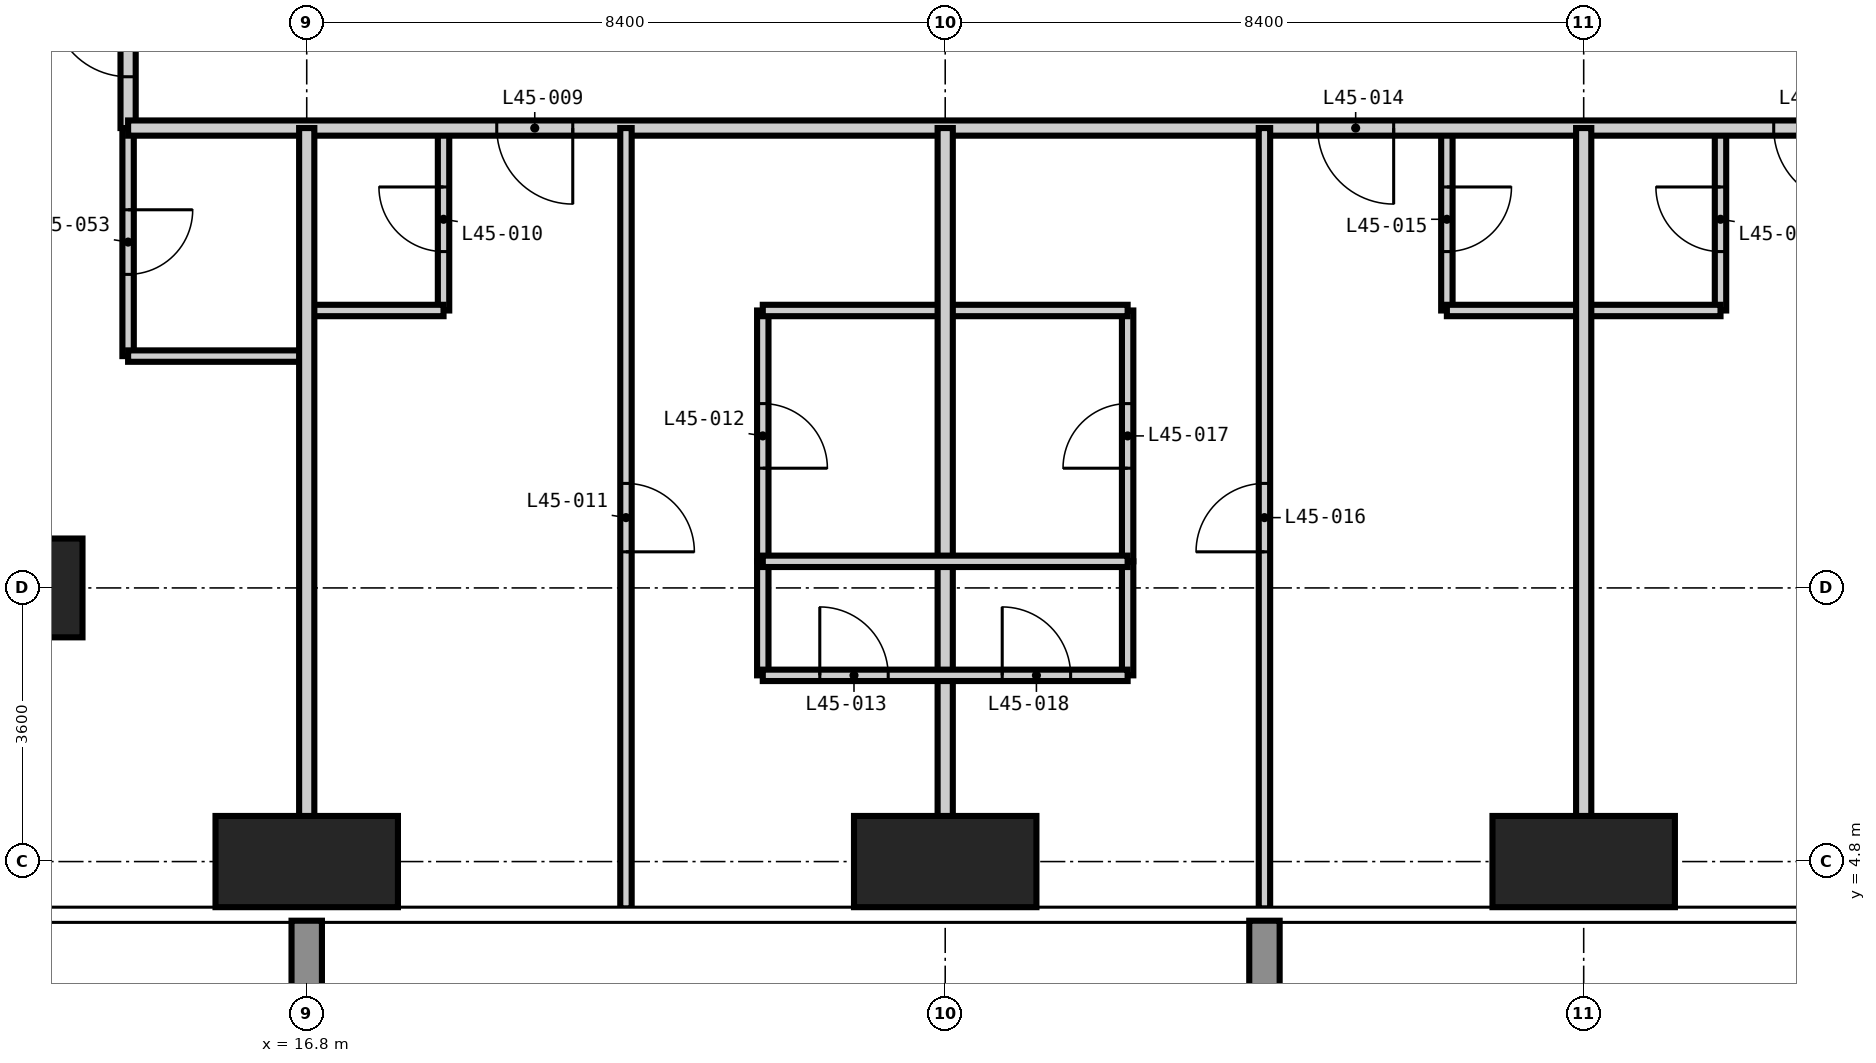
"""IFC4 building model, lengths in metres.
Left out: names, types, materials, properties, quantities, classifications, styles, units other than length and angle.
Written with IfcOpenShell. Run it as: python <this file> out.ifc"""

import sys

from ifc_helpers import new_model, si_unit, direction, frame, frame_2d, origin, origin_2d, place, context, subcontext, project, spatial, rectangle, extrude, element, fill, save


model = new_model("IFC4")
c1 = context("Model", 3, precision=1e-05, world=origin(), true_north=direction((0.0, 1.0)))
c2 = subcontext(c1, "Body", "Model", "MODEL_VIEW")
j1 = project(units=[si_unit("LENGTHUNIT", "METRE"), si_unit("PLANEANGLEUNIT", "RADIAN")], contexts=[c1])
p1 = place(None, origin())
s1 = spatial("IfcSite", under=j1, at=p1, CompositionType="ELEMENT")
p2 = place(p1, origin())
s2 = spatial("IfcBuilding", under=s1, at=p2, CompositionType="ELEMENT")
p3 = place(p2, frame((0.0, 0.0, 177.0)))
s3 = spatial("IfcBuildingStorey", under=s2, at=p3, CompositionType="ELEMENT", Elevation=177.0)
p4 = place(p3, frame((13.2, 8.4, -0.35), z_axis=(0.0, 0.0, 1.0), x_axis=(1.0, 0.0, 0.0)))
e1 = element("IfcColumn", 1, at=p4, inside=s3, PredefinedType="COLUMN", context=c2, shape_type="SweptSolid", body=[
    extrude(rectangle(XDim=1.3, YDim=1.3, at=origin_2d()), origin(), (0.0, 0.0, 1.0), 3.6),
])
for number, where, z_axis, x_axis in (
    (2, (16.8, 4.8, -0.35), (0.0, 0.0, 1.0), (1.0, 0.0, 0.0)),
    (3, (25.2, 4.8, -0.35), (0.0, 0.0, 1.0), (1.0, 0.0, 0.0)),
    (4, (33.6, 4.8, -0.35), (0.0, 0.0, 1.0), (1.0, 0.0, 0.0)),
):
    element("IfcColumn", number, at=place(p3, frame(where, z_axis=z_axis, x_axis=x_axis)), inside=s3, PredefinedType="COLUMN", context=c2, shape_type="SweptSolid", body=[
        extrude(rectangle(XDim=2.4, YDim=1.2, at=origin_2d()), origin(), (0.0, 0.0, 1.0), 3.6),
    ])
p5 = place(p3, frame((14.45, 11.45, 0.0), z_axis=(0.0, 0.0, 1.0), x_axis=(0.0, 1.0, 0.0)))
e5 = element("IfcWall", 5, at=p5, inside=s3, PredefinedType="PARTITIONING", context=c2, shape_type="SweptSolid", body=[
    extrude(rectangle(XDim=3.0, YDim=0.15, at=frame_2d((1.5, 0.0))), origin(), (0.0, 0.0, 1.0), 3.25),
])
p6 = place(p5, frame((1.075, 0.0, 0.0)))
e6 = element("IfcOpeningElement", 6, at=p6, cuts=e5, PredefinedType="OPENING", context=c2, shape_type="SweptSolid", body=[
    extrude(rectangle(XDim=0.85, YDim=2.1, at=frame_2d((0.425, 1.05))), frame((0.0, 0.085, 0.0), z_axis=(0.0, -1.0, 0.0), x_axis=(1.0, 0.0, 0.0)), (0.0, 0.0, 1.0), 0.17),
])
p7 = place(p3, frame((18.6, 12.05, 0.0), z_axis=(0.0, 0.0, 1.0), x_axis=(0.0, 1.0, 0.0)))
e7 = element("IfcWall", 7, at=p7, inside=s3, PredefinedType="PARTITIONING", context=c2, shape_type="SweptSolid", body=[
    extrude(rectangle(XDim=2.4, YDim=0.15, at=frame_2d((1.2, 0.0))), origin(), (0.0, 0.0, 1.0), 3.25),
])
p8 = place(p7, frame((0.775, 0.0, 0.0)))
e8 = element("IfcOpeningElement", 8, at=p8, cuts=e7, PredefinedType="OPENING", context=c2, shape_type="SweptSolid", body=[
    extrude(rectangle(XDim=0.85, YDim=2.1, at=frame_2d((0.425, 1.05))), frame((0.0, 0.085, 0.0), z_axis=(0.0, -1.0, 0.0), x_axis=(1.0, 0.0, 0.0)), (0.0, 0.0, 1.0), 0.17),
])
p9 = place(p3, frame((22.8, 8.75, 0.0), z_axis=(0.0, 0.0, 1.0), x_axis=(0.0, 1.0, 0.0)))
e9 = element("IfcWall", 9, at=p9, inside=s3, PredefinedType="PARTITIONING", context=c2, shape_type="SweptSolid", body=[
    extrude(rectangle(XDim=3.3, YDim=0.15, at=frame_2d((1.65, 0.0))), origin(), (0.0, 0.0, 1.0), 3.25),
])
p10 = place(p9, frame((1.225, 0.0, 0.0)))
e10 = element("IfcOpeningElement", 10, at=p10, cuts=e9, PredefinedType="OPENING", context=c2, shape_type="SweptSolid", body=[
    extrude(rectangle(XDim=0.85, YDim=2.1, at=frame_2d((0.425, 1.05))), frame((0.0, 0.085, 0.0), z_axis=(0.0, -1.0, 0.0), x_axis=(1.0, 0.0, 0.0)), (0.0, 0.0, 1.0), 0.17),
])
p11 = place(p3, frame((27.6, 8.75, 0.0), z_axis=(0.0, 0.0, 1.0), x_axis=(0.0, 1.0, 0.0)))
e11 = element("IfcWall", 11, at=p11, inside=s3, PredefinedType="PARTITIONING", context=c2, shape_type="SweptSolid", body=[
    extrude(rectangle(XDim=3.3, YDim=0.15, at=frame_2d((1.65, 0.0))), origin(), (0.0, 0.0, 1.0), 3.25),
])
p12 = place(p11, frame((1.225, 0.0, 0.0)))
e12 = element("IfcOpeningElement", 12, at=p12, cuts=e11, PredefinedType="OPENING", context=c2, shape_type="SweptSolid", body=[
    extrude(rectangle(XDim=0.85, YDim=2.1, at=frame_2d((0.425, 1.05))), frame((0.0, 0.085, 0.0), z_axis=(0.0, -1.0, 0.0), x_axis=(1.0, 0.0, 0.0)), (0.0, 0.0, 1.0), 0.17),
])
p13 = place(p3, frame((31.8, 12.05, 0.0), z_axis=(0.0, 0.0, 1.0), x_axis=(0.0, 1.0, 0.0)))
e13 = element("IfcWall", 13, at=p13, inside=s3, PredefinedType="PARTITIONING", context=c2, shape_type="SweptSolid", body=[
    extrude(rectangle(XDim=2.4, YDim=0.15, at=frame_2d((1.2, 0.0))), origin(), (0.0, 0.0, 1.0), 3.25),
])
p14 = place(p13, frame((0.775, 0.0, 0.0)))
e14 = element("IfcOpeningElement", 14, at=p14, cuts=e13, PredefinedType="OPENING", context=c2, shape_type="SweptSolid", body=[
    extrude(rectangle(XDim=0.85, YDim=2.1, at=frame_2d((0.425, 1.05))), frame((0.0, 0.085, 0.0), z_axis=(0.0, -1.0, 0.0), x_axis=(1.0, 0.0, 0.0)), (0.0, 0.0, 1.0), 0.17),
])
p15 = place(p3, frame((35.4, 12.05, 0.0), z_axis=(0.0, 0.0, 1.0), x_axis=(0.0, 1.0, 0.0)))
e15 = element("IfcWall", 15, at=p15, inside=s3, PredefinedType="PARTITIONING", context=c2, shape_type="SweptSolid", body=[
    extrude(rectangle(XDim=2.4, YDim=0.15, at=frame_2d((1.2, 0.0))), origin(), (0.0, 0.0, 1.0), 3.25),
])
p16 = place(p15, frame((0.775, 0.0, 0.0)))
e16 = element("IfcOpeningElement", 16, at=p16, cuts=e15, PredefinedType="OPENING", context=c2, shape_type="SweptSolid", body=[
    extrude(rectangle(XDim=0.85, YDim=2.1, at=frame_2d((0.425, 1.05))), frame((0.0, 0.085, 0.0), z_axis=(0.0, -1.0, 0.0), x_axis=(1.0, 0.0, 0.0)), (0.0, 0.0, 1.0), 0.17),
])
p17 = place(p3, frame((14.45, 11.45, 0.0), z_axis=(0.0, 0.0, 1.0), x_axis=(1.0, 0.0, 0.0)))
e17 = element("IfcWall", 17, at=p17, inside=s3, PredefinedType="PARTITIONING", context=c2, shape_type="SweptSolid", body=[
    extrude(rectangle(XDim=2.35, YDim=0.15, at=frame_2d((1.175, 0.0))), origin(), (0.0, 0.0, 1.0), 3.25),
])
p18 = place(p3, frame((16.8, 12.05, 0.0), z_axis=(0.0, 0.0, 1.0), x_axis=(1.0, 0.0, 0.0)))
e18 = element("IfcWall", 18, at=p18, inside=s3, PredefinedType="PARTITIONING", context=c2, shape_type="SweptSolid", body=[
    extrude(rectangle(XDim=1.8, YDim=0.15, at=frame_2d((0.9, 0.0))), origin(), (0.0, 0.0, 1.0), 3.25),
])
p19 = place(p3, frame((22.8, 12.05, 0.0), z_axis=(0.0, 0.0, 1.0), x_axis=(1.0, 0.0, 0.0)))
e19 = element("IfcWall", 19, at=p19, inside=s3, PredefinedType="PARTITIONING", context=c2, shape_type="SweptSolid", body=[
    extrude(rectangle(XDim=4.8, YDim=0.15, at=frame_2d((2.4, 0.0))), origin(), (0.0, 0.0, 1.0), 3.25),
])
p20 = place(p3, frame((31.8, 12.05, 0.0), z_axis=(0.0, 0.0, 1.0), x_axis=(1.0, 0.0, 0.0)))
e20 = element("IfcWall", 20, at=p20, inside=s3, PredefinedType="PARTITIONING", context=c2, shape_type="SweptSolid", body=[
    extrude(rectangle(XDim=3.6, YDim=0.15, at=frame_2d((1.8, 0.0))), origin(), (0.0, 0.0, 1.0), 3.25),
])
p21 = place(p3, frame((14.45, 14.45, 0.0), z_axis=(0.0, 0.0, 1.0), x_axis=(0.0, 1.0, 0.0)))
e21 = element("IfcWall", 21, at=p21, inside=s3, PredefinedType="PARTITIONING", context=c2, shape_type="SweptSolid", body=[
    extrude(rectangle(XDim=31.1, YDim=0.2, at=frame_2d((15.55, 0.0))), origin(), (0.0, 0.0, 1.0), 3.25),
])
p22 = place(p21, frame((6.05, 0.0, 0.0)))
e22 = element("IfcOpeningElement", 22, at=p22, cuts=e21, PredefinedType="OPENING", context=c2, shape_type="SweptSolid", body=[
    extrude(rectangle(XDim=1.0, YDim=2.2, at=frame_2d((0.5, 1.1))), frame((0.0, 0.11, 0.0), z_axis=(0.0, -1.0, 0.0), x_axis=(1.0, 0.0, 0.0)), (0.0, 0.0, 1.0), 0.22),
])
p23 = place(p21, frame((11.95, 0.0, 0.0)))
e23 = element("IfcOpeningElement", 23, at=p23, cuts=e21, PredefinedType="OPENING", context=c2, shape_type="SweptSolid", body=[
    extrude(rectangle(XDim=1.8, YDim=2.4, at=frame_2d((0.9, 1.2))), frame((0.0, 0.11, 0.0), z_axis=(0.0, -1.0, 0.0), x_axis=(1.0, 0.0, 0.0)), (0.0, 0.0, 1.0), 0.22),
])
p24 = place(p21, frame((19.575, 0.0, 0.0)))
e24 = element("IfcOpeningElement", 24, at=p24, cuts=e21, PredefinedType="OPENING", context=c2, shape_type="SweptSolid", body=[
    extrude(rectangle(XDim=1.0, YDim=2.2, at=frame_2d((0.5, 1.1))), frame((0.0, 0.11, 0.0), z_axis=(0.0, -1.0, 0.0), x_axis=(1.0, 0.0, 0.0)), (0.0, 0.0, 1.0), 0.22),
])
p25 = place(p21, frame((24.95, 0.0, 0.0)))
e25 = element("IfcOpeningElement", 25, at=p25, cuts=e21, PredefinedType="OPENING", context=c2, shape_type="SweptSolid", body=[
    extrude(rectangle(XDim=1.0, YDim=2.2, at=frame_2d((0.5, 1.1))), frame((0.0, 0.11, 0.0), z_axis=(0.0, -1.0, 0.0), x_axis=(1.0, 0.0, 0.0)), (0.0, 0.0, 1.0), 0.22),
])
p26 = place(p21, frame((0.675, 0.0, 0.0)))
e26 = element("IfcOpeningElement", 26, at=p26, cuts=e21, PredefinedType="OPENING", context=c2, shape_type="SweptSolid", body=[
    extrude(rectangle(XDim=1.0, YDim=2.2, at=frame_2d((0.5, 1.1))), frame((0.0, 0.11, 0.0), z_axis=(0.0, -1.0, 0.0), x_axis=(1.0, 0.0, 0.0)), (0.0, 0.0, 1.0), 0.22),
])
p27 = place(p21, frame((28.825, 0.0, 0.0)))
e27 = element("IfcOpeningElement", 27, at=p27, cuts=e21, PredefinedType="OPENING", context=c2, shape_type="SweptSolid", body=[
    extrude(rectangle(XDim=1.0, YDim=2.2, at=frame_2d((0.5, 1.1))), frame((0.0, 0.11, 0.0), z_axis=(0.0, -1.0, 0.0), x_axis=(1.0, 0.0, 0.0)), (0.0, 0.0, 1.0), 0.22),
])
p28 = place(p3, frame((44.95, 14.45, 0.0), z_axis=(0.0, 0.0, 1.0), x_axis=(-1.0, 0.0, 0.0)))
e28 = element("IfcWall", 28, at=p28, inside=s3, PredefinedType="PARTITIONING", context=c2, shape_type="SweptSolid", body=[
    extrude(rectangle(XDim=30.5, YDim=0.2, at=frame_2d((15.25, 0.0))), origin(), (0.0, 0.0, 1.0), 3.25),
])
p29 = place(p28, frame((24.65, 0.0, 0.0)))
e29 = element("IfcOpeningElement", 29, at=p29, cuts=e28, PredefinedType="OPENING", context=c2, shape_type="SweptSolid", body=[
    extrude(rectangle(XDim=1.0, YDim=2.2, at=frame_2d((0.5, 1.1))), frame((0.0, 0.11, 0.0), z_axis=(0.0, -1.0, 0.0), x_axis=(1.0, 0.0, 0.0)), (0.0, 0.0, 1.0), 0.22),
])
p30 = place(p28, frame((13.85, 0.0, 0.0)))
e30 = element("IfcOpeningElement", 30, at=p30, cuts=e28, PredefinedType="OPENING", context=c2, shape_type="SweptSolid", body=[
    extrude(rectangle(XDim=1.0, YDim=2.2, at=frame_2d((0.5, 1.1))), frame((0.0, 0.11, 0.0), z_axis=(0.0, -1.0, 0.0), x_axis=(1.0, 0.0, 0.0)), (0.0, 0.0, 1.0), 0.22),
])
p31 = place(p28, frame((7.85, 0.0, 0.0)))
e31 = element("IfcOpeningElement", 31, at=p31, cuts=e28, PredefinedType="OPENING", context=c2, shape_type="SweptSolid", body=[
    extrude(rectangle(XDim=1.0, YDim=2.2, at=frame_2d((0.5, 1.1))), frame((0.0, 0.11, 0.0), z_axis=(0.0, -1.0, 0.0), x_axis=(1.0, 0.0, 0.0)), (0.0, 0.0, 1.0), 0.22),
])
for number, where, z_axis, x_axis in (
    (32, (16.8, 4.182, 0.0), (0.0, 0.0, 1.0), (0.0, 1.0, 0.0)),
    (33, (25.2, 4.182, 0.0), (0.0, 0.0, 1.0), (0.0, 1.0, 0.0)),
    (34, (33.6, 4.182, 0.0), (0.0, 0.0, 1.0), (0.0, 1.0, 0.0)),
):
    element("IfcWall", number, at=place(p3, frame(where, z_axis=z_axis, x_axis=x_axis)), inside=s3, PredefinedType="PARTITIONING", context=c2, shape_type="SweptSolid", body=[
        extrude(rectangle(XDim=10.268, YDim=0.2, at=frame_2d((5.134, 0.0))), origin(), (0.0, 0.0, 1.0), 3.25),
    ])
p32 = place(p3, frame((21.0, 4.182, 0.0), z_axis=(0.0, 0.0, 1.0), x_axis=(0.0, 1.0, 0.0)))
e35 = element("IfcWall", 35, at=p32, inside=s3, PredefinedType="PARTITIONING", context=c2, shape_type="SweptSolid", body=[
    extrude(rectangle(XDim=10.268, YDim=0.15, at=frame_2d((5.134, 0.0))), origin(), (0.0, 0.0, 1.0), 3.25),
])
p33 = place(p32, frame((4.693, 0.0, 0.0)))
e36 = element("IfcOpeningElement", 36, at=p33, cuts=e35, PredefinedType="OPENING", context=c2, shape_type="SweptSolid", body=[
    extrude(rectangle(XDim=0.9, YDim=2.1, at=frame_2d((0.45, 1.05))), frame((0.0, 0.085, 0.0), z_axis=(0.0, -1.0, 0.0), x_axis=(1.0, 0.0, 0.0)), (0.0, 0.0, 1.0), 0.17),
])
for number, where, z_axis, x_axis in (
    (37, (22.8, 7.25, 0.0), (0.0, 0.0, 1.0), (0.0, 1.0, 0.0)),
    (38, (27.6, 7.25, 0.0), (0.0, 0.0, 1.0), (0.0, 1.0, 0.0)),
):
    element("IfcWall", number, at=place(p3, frame(where, z_axis=z_axis, x_axis=x_axis)), inside=s3, PredefinedType="PARTITIONING", context=c2, shape_type="SweptSolid", body=[
        extrude(rectangle(XDim=1.5, YDim=0.15, at=frame_2d((0.75, 0.0))), origin(), (0.0, 0.0, 1.0), 3.25),
    ])
p34 = place(p3, frame((29.4, 4.182, 0.0), z_axis=(0.0, 0.0, 1.0), x_axis=(0.0, 1.0, 0.0)))
e39 = element("IfcWall", 39, at=p34, inside=s3, PredefinedType="PARTITIONING", context=c2, shape_type="SweptSolid", body=[
    extrude(rectangle(XDim=10.268, YDim=0.15, at=frame_2d((5.134, 0.0))), origin(), (0.0, 0.0, 1.0), 3.25),
])
p35 = place(p34, frame((4.693, 0.0, 0.0)))
e40 = element("IfcOpeningElement", 40, at=p35, cuts=e39, PredefinedType="OPENING", context=c2, shape_type="SweptSolid", body=[
    extrude(rectangle(XDim=0.9, YDim=2.1, at=frame_2d((0.45, 1.05))), frame((0.0, 0.085, 0.0), z_axis=(0.0, -1.0, 0.0), x_axis=(1.0, 0.0, 0.0)), (0.0, 0.0, 1.0), 0.17),
])
p36 = place(p3, frame((22.8, 7.25, 0.0), z_axis=(0.0, 0.0, 1.0), x_axis=(1.0, 0.0, 0.0)))
e41 = element("IfcWall", 41, at=p36, inside=s3, PredefinedType="PARTITIONING", context=c2, shape_type="SweptSolid", body=[
    extrude(rectangle(XDim=4.8, YDim=0.15, at=frame_2d((2.4, 0.0))), origin(), (0.0, 0.0, 1.0), 3.25),
])
p37 = place(p36, frame((0.75, 0.0, 0.0)))
e42 = element("IfcOpeningElement", 42, at=p37, cuts=e41, PredefinedType="OPENING", context=c2, shape_type="SweptSolid", body=[
    extrude(rectangle(XDim=0.9, YDim=2.1, at=frame_2d((0.45, 1.05))), frame((0.0, 0.085, 0.0), z_axis=(0.0, -1.0, 0.0), x_axis=(1.0, 0.0, 0.0)), (0.0, 0.0, 1.0), 0.17),
])
p38 = place(p36, frame((3.15, 0.0, 0.0)))
e43 = element("IfcOpeningElement", 43, at=p38, cuts=e41, PredefinedType="OPENING", context=c2, shape_type="SweptSolid", body=[
    extrude(rectangle(XDim=0.9, YDim=2.1, at=frame_2d((0.45, 1.05))), frame((0.0, 0.085, 0.0), z_axis=(0.0, -1.0, 0.0), x_axis=(1.0, 0.0, 0.0)), (0.0, 0.0, 1.0), 0.17),
])
p39 = place(p3, frame((22.8, 8.75, 0.0), z_axis=(0.0, 0.0, 1.0), x_axis=(1.0, 0.0, 0.0)))
e44 = element("IfcWall", 44, at=p39, inside=s3, PredefinedType="PARTITIONING", context=c2, shape_type="SweptSolid", body=[
    extrude(rectangle(XDim=4.8, YDim=0.15, at=frame_2d((2.4, 0.0))), origin(), (0.0, 0.0, 1.0), 3.25),
])
p40 = place(p29, origin())
e45 = element("IfcDoor", 45, at=p40, inside=s3, OperationType="SINGLE_SWING_LEFT", PredefinedType="DOOR", context=c2, shape_type="SweptSolid", body=[
    extrude(rectangle(XDim=1.0, YDim=2.2, at=frame_2d((0.5, 1.1))), frame((0.0, 0.025, 0.0), z_axis=(0.0, -1.0, 0.0), x_axis=(1.0, 0.0, 0.0)), (0.0, 0.0, 1.0), 0.05),
])
fill(e29, e45)
p41 = place(p8, origin())
e46 = element("IfcDoor", 46, at=p41, inside=s3, OperationType="SINGLE_SWING_RIGHT", PredefinedType="DOOR", context=c2, shape_type="SweptSolid", body=[
    extrude(rectangle(XDim=0.85, YDim=2.1, at=frame_2d((0.425, 1.05))), frame((0.0, 0.025, 0.0), z_axis=(0.0, -1.0, 0.0), x_axis=(1.0, 0.0, 0.0)), (0.0, 0.0, 1.0), 0.05),
])
fill(e8, e46)
p42 = place(p33, frame((0.9, 0.0, 0.0), z_axis=(0.0, 0.0, 1.0), x_axis=(-1.0, 0.0, 0.0)))
e47 = element("IfcDoor", 47, at=p42, inside=s3, OperationType="SINGLE_SWING_RIGHT", PredefinedType="DOOR", context=c2, shape_type="SweptSolid", body=[
    extrude(rectangle(XDim=0.9, YDim=2.1, at=frame_2d((0.45, 1.05))), frame((0.0, 0.025, 0.0), z_axis=(0.0, -1.0, 0.0), x_axis=(1.0, 0.0, 0.0)), (0.0, 0.0, 1.0), 0.05),
])
fill(e36, e47)
p43 = place(p10, frame((0.85, 0.0, 0.0), z_axis=(0.0, 0.0, 1.0), x_axis=(-1.0, 0.0, 0.0)))
e48 = element("IfcDoor", 48, at=p43, inside=s3, OperationType="SINGLE_SWING_RIGHT", PredefinedType="DOOR", context=c2, shape_type="SweptSolid", body=[
    extrude(rectangle(XDim=0.85, YDim=2.1, at=frame_2d((0.425, 1.05))), frame((0.0, 0.025, 0.0), z_axis=(0.0, -1.0, 0.0), x_axis=(1.0, 0.0, 0.0)), (0.0, 0.0, 1.0), 0.05),
])
fill(e10, e48)
p44 = place(p37, origin())
e49 = element("IfcDoor", 49, at=p44, inside=s3, OperationType="SINGLE_SWING_LEFT", PredefinedType="DOOR", context=c2, shape_type="SweptSolid", body=[
    extrude(rectangle(XDim=0.9, YDim=2.1, at=frame_2d((0.45, 1.05))), frame((0.0, 0.025, 0.0), z_axis=(0.0, -1.0, 0.0), x_axis=(1.0, 0.0, 0.0)), (0.0, 0.0, 1.0), 0.05),
])
fill(e42, e49)
p45 = place(p30, origin())
e50 = element("IfcDoor", 50, at=p45, inside=s3, OperationType="SINGLE_SWING_LEFT", PredefinedType="DOOR", context=c2, shape_type="SweptSolid", body=[
    extrude(rectangle(XDim=1.0, YDim=2.2, at=frame_2d((0.5, 1.1))), frame((0.0, 0.025, 0.0), z_axis=(0.0, -1.0, 0.0), x_axis=(1.0, 0.0, 0.0)), (0.0, 0.0, 1.0), 0.05),
])
fill(e30, e50)
p46 = place(p14, frame((0.85, 0.0, 0.0), z_axis=(0.0, 0.0, 1.0), x_axis=(-1.0, 0.0, 0.0)))
e51 = element("IfcDoor", 51, at=p46, inside=s3, OperationType="SINGLE_SWING_LEFT", PredefinedType="DOOR", context=c2, shape_type="SweptSolid", body=[
    extrude(rectangle(XDim=0.85, YDim=2.1, at=frame_2d((0.425, 1.05))), frame((0.0, 0.025, 0.0), z_axis=(0.0, -1.0, 0.0), x_axis=(1.0, 0.0, 0.0)), (0.0, 0.0, 1.0), 0.05),
])
fill(e14, e51)
p47 = place(p35, origin())
e52 = element("IfcDoor", 52, at=p47, inside=s3, OperationType="SINGLE_SWING_LEFT", PredefinedType="DOOR", context=c2, shape_type="SweptSolid", body=[
    extrude(rectangle(XDim=0.9, YDim=2.1, at=frame_2d((0.45, 1.05))), frame((0.0, 0.025, 0.0), z_axis=(0.0, -1.0, 0.0), x_axis=(1.0, 0.0, 0.0)), (0.0, 0.0, 1.0), 0.05),
])
fill(e40, e52)
p48 = place(p12, origin())
e53 = element("IfcDoor", 53, at=p48, inside=s3, OperationType="SINGLE_SWING_LEFT", PredefinedType="DOOR", context=c2, shape_type="SweptSolid", body=[
    extrude(rectangle(XDim=0.85, YDim=2.1, at=frame_2d((0.425, 1.05))), frame((0.0, 0.025, 0.0), z_axis=(0.0, -1.0, 0.0), x_axis=(1.0, 0.0, 0.0)), (0.0, 0.0, 1.0), 0.05),
])
fill(e12, e53)
p49 = place(p38, origin())
e54 = element("IfcDoor", 54, at=p49, inside=s3, OperationType="SINGLE_SWING_LEFT", PredefinedType="DOOR", context=c2, shape_type="SweptSolid", body=[
    extrude(rectangle(XDim=0.9, YDim=2.1, at=frame_2d((0.45, 1.05))), frame((0.0, 0.025, 0.0), z_axis=(0.0, -1.0, 0.0), x_axis=(1.0, 0.0, 0.0)), (0.0, 0.0, 1.0), 0.05),
])
fill(e43, e54)
p50 = place(p31, origin())
e55 = element("IfcDoor", 55, at=p50, inside=s3, OperationType="SINGLE_SWING_LEFT", PredefinedType="DOOR", context=c2, shape_type="SweptSolid", body=[
    extrude(rectangle(XDim=1.0, YDim=2.2, at=frame_2d((0.5, 1.1))), frame((0.0, 0.025, 0.0), z_axis=(0.0, -1.0, 0.0), x_axis=(1.0, 0.0, 0.0)), (0.0, 0.0, 1.0), 0.05),
])
fill(e31, e55)
p51 = place(p16, origin())
e56 = element("IfcDoor", 56, at=p51, inside=s3, OperationType="SINGLE_SWING_RIGHT", PredefinedType="DOOR", context=c2, shape_type="SweptSolid", body=[
    extrude(rectangle(XDim=0.85, YDim=2.1, at=frame_2d((0.425, 1.05))), frame((0.0, 0.025, 0.0), z_axis=(0.0, -1.0, 0.0), x_axis=(1.0, 0.0, 0.0)), (0.0, 0.0, 1.0), 0.05),
])
fill(e16, e56)
p52 = place(p26, origin())
e57 = element("IfcDoor", 57, at=p52, inside=s3, OperationType="SINGLE_SWING_RIGHT", PredefinedType="DOOR", context=c2, shape_type="SweptSolid", body=[
    extrude(rectangle(XDim=1.0, YDim=2.2, at=frame_2d((0.5, 1.1))), frame((0.0, 0.025, 0.0), z_axis=(0.0, -1.0, 0.0), x_axis=(1.0, 0.0, 0.0)), (0.0, 0.0, 1.0), 0.05),
])
fill(e26, e57)
p53 = place(p6, frame((0.85, 0.0, 0.0), z_axis=(0.0, 0.0, 1.0), x_axis=(-1.0, 0.0, 0.0)))
e58 = element("IfcDoor", 58, at=p53, inside=s3, OperationType="SINGLE_SWING_LEFT", PredefinedType="DOOR", context=c2, shape_type="SweptSolid", body=[
    extrude(rectangle(XDim=0.85, YDim=2.1, at=frame_2d((0.425, 1.05))), frame((0.0, 0.025, 0.0), z_axis=(0.0, -1.0, 0.0), x_axis=(1.0, 0.0, 0.0)), (0.0, 0.0, 1.0), 0.05),
])
fill(e6, e58)
save(model, sys.argv[1])
